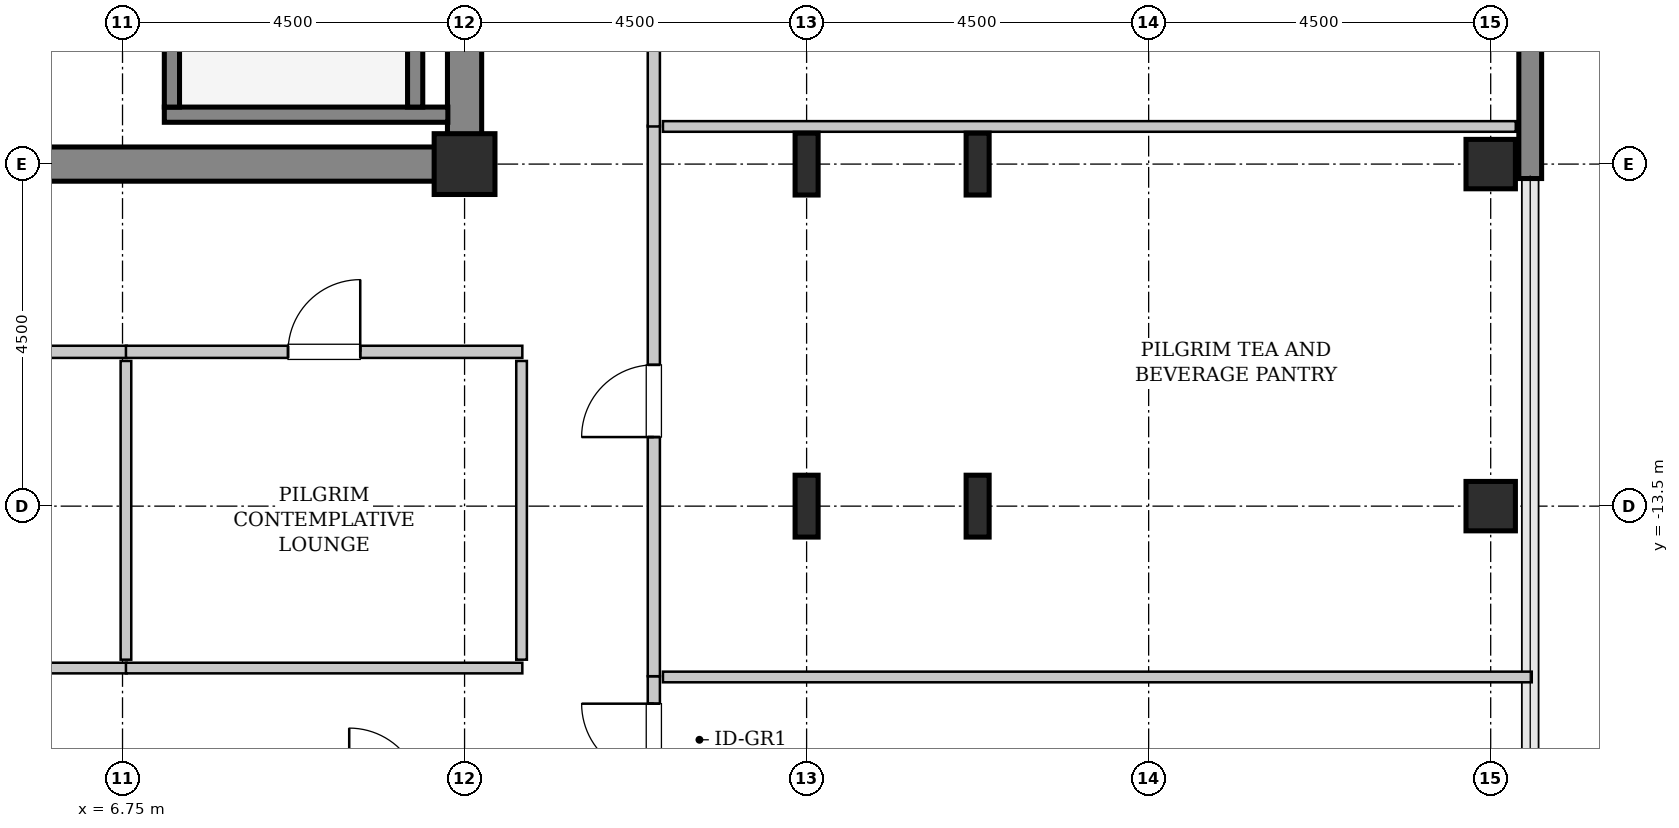
"""IFC4 building model, lengths in metres.
Left out: names, types, materials, properties, quantities, classifications, styles, units other than length and angle.
Written with IfcOpenShell. Run it as: python <this file> out.ifc"""

import sys

from ifc_helpers import new_model, si_unit, direction, frame, frame_2d, origin, origin_2d, place, context, subcontext, project, spatial, rectangle, hollow_rectangle, i_section, extrude, source, transform, mapped, element, fill, save


model = new_model("IFC4")
c1 = context("Model", 3, precision=1e-05, world=origin(), true_north=direction((0.0, 1.0)))
c2 = subcontext(c1, "Body", "Model", "MODEL_VIEW")
j1 = project(units=[si_unit("LENGTHUNIT", "METRE"), si_unit("PLANEANGLEUNIT", "RADIAN")], contexts=[c1])
p1 = place(None, origin())
s1 = spatial("IfcSite", under=j1, at=p1, CompositionType="ELEMENT")
p2 = place(p1, origin())
s2 = spatial("IfcBuilding", under=s1, at=p2, CompositionType="ELEMENT")
p3 = place(p2, frame((0.0, 0.0, 252.2)))
s3 = spatial("IfcBuildingStorey", under=s2, at=p3, CompositionType="ELEMENT", Elevation=252.2)
m1 = source(origin(), c2, "Body", "SweptSolid", [
    extrude(rectangle(XDim=9.925, YDim=0.45, at=frame_2d((4.962, 0.0))), origin(), (0.0, 0.0, 1.0), 3.8),
])
p4 = place(p3, frame((1.55, -9.0, 0.0), z_axis=(0.0, 0.0, 1.0), x_axis=(1.0, 0.0, 0.0)))
e1 = element("IfcWall", 1, at=p4, inside=s3, PredefinedType="SHEAR", context=c2, shape_type="MappedRepresentation", body=[
    mapped(m1, transform((0.0, 0.0, 0.0), x_axis=(1.0, 0.0, 0.0), y_axis=(0.0, 1.0, 0.0), z_axis=(0.0, 0.0, 1.0), scale=1.0)),
])
m2 = source(origin(), c2, "Body", "SweptSolid", [
    extrude(rectangle(XDim=7.425, YDim=0.45, at=frame_2d((3.712, 0.0))), origin(), (0.0, 0.0, 1.0), 3.8),
])
p5 = place(p3, frame((11.25, -8.775, 0.0), z_axis=(0.0, 0.0, 1.0), x_axis=(0.0, 1.0, 0.0)))
e2 = element("IfcWall", 2, at=p5, inside=s3, PredefinedType="SHEAR", context=c2, shape_type="MappedRepresentation", body=[
    mapped(m2, transform((0.0, 0.0, 0.0), x_axis=(1.0, 0.0, 0.0), y_axis=(0.0, 1.0, 0.0), z_axis=(0.0, 0.0, 1.0), scale=1.0)),
])
m3 = source(origin(), c2, "Body", "SweptSolid", [
    extrude(hollow_rectangle(XDim=0.8, YDim=0.8, WallThickness=0.04, InnerFilletRadius=0.04, OuterFilletRadius=0.08, at=origin_2d()), origin(), (0.0, 0.0, 1.0), 3.8),
])
p6 = place(p3, frame((11.25, -9.0, 0.0), z_axis=(0.0, 0.0, 1.0), x_axis=(1.0, 0.0, 0.0)))
e3 = element("IfcColumn", 3, at=p6, inside=s3, PredefinedType="COLUMN", context=c2, shape_type="MappedRepresentation", body=[
    mapped(m3, transform((0.0, 0.0, 0.0), x_axis=(1.0, 0.0, 0.0), y_axis=(0.0, 1.0, 0.0), z_axis=(0.0, 0.0, 1.0), scale=1.0)),
])
m4 = source(origin(), c2, "Body", "SweptSolid", [
    extrude(i_section(OverallWidth=0.303, OverallDepth=0.814, WebThickness=0.021, FlangeThickness=0.04, FilletRadius=0.03, at=origin_2d()), origin(), (0.0, 0.0, 1.0), 3.8),
])
for number, where, z_axis, x_axis in (
    (4, (15.75, -13.5, 0.0), (0.0, 0.0, 1.0), (1.0, 0.0, 0.0)),
    (5, (15.75, -9.0, 0.0), (0.0, 0.0, 1.0), (1.0, 0.0, 0.0)),
    (6, (18.0, -13.5, 0.0), (0.0, 0.0, 1.0), (1.0, 0.0, 0.0)),
    (7, (18.0, -9.0, 0.0), (0.0, 0.0, 1.0), (1.0, 0.0, 0.0)),
):
    element("IfcColumn", number, at=place(p3, frame(where, z_axis=z_axis, x_axis=x_axis)), inside=s3, PredefinedType="COLUMN", context=c2, shape_type="MappedRepresentation", body=[
        mapped(m4, transform((0.0, 0.0, 0.0), x_axis=(1.0, 0.0, 0.0), y_axis=(0.0, 1.0, 0.0), z_axis=(0.0, 0.0, 1.0), scale=1.0)),
    ])
m5 = source(origin(), c2, "Body", "SweptSolid", [
    extrude(hollow_rectangle(XDim=0.65, YDim=0.65, WallThickness=0.032, InnerFilletRadius=0.032, OuterFilletRadius=0.064, at=origin_2d()), origin(), (0.0, 0.0, 1.0), 3.8),
])
for number, where, z_axis, x_axis in (
    (8, (24.75, -13.5, 0.0), (0.0, 0.0, 1.0), (1.0, 0.0, 0.0)),
    (9, (24.75, -9.0, 0.0), (0.0, 0.0, 1.0), (1.0, 0.0, 0.0)),
):
    element("IfcColumn", number, at=place(p3, frame(where, z_axis=z_axis, x_axis=x_axis)), inside=s3, PredefinedType="COLUMN", context=c2, shape_type="MappedRepresentation", body=[
        mapped(m5, transform((0.0, 0.0, 0.0), x_axis=(1.0, 0.0, 0.0), y_axis=(0.0, 1.0, 0.0), z_axis=(0.0, 0.0, 1.0), scale=1.0)),
    ])
m6 = source(origin(), c2, "Body", "SweptSolid", [
    extrude(rectangle(XDim=4.88, YDim=0.3, at=frame_2d((2.44, 0.0))), origin(), (0.0, 0.0, 1.0), 3.55),
])
p7 = place(p3, frame((25.27, -9.19, 0.0), z_axis=(0.0, 0.0, 1.0), x_axis=(0.0, 1.0, 0.0)))
e10 = element("IfcWall", 10, at=p7, inside=s3, PredefinedType="SHEAR", context=c2, shape_type="MappedRepresentation", body=[
    mapped(m6, transform((0.0, 0.0, 0.0), x_axis=(1.0, 0.0, 0.0), y_axis=(0.0, 1.0, 0.0), z_axis=(0.0, 0.0, 1.0), scale=1.0)),
])
m7 = source(origin(), c2, "Body", "SweptSolid", [
    extrude(rectangle(XDim=3.73, YDim=0.2, at=frame_2d((1.865, 0.0))), origin(), (0.0, 0.0, 1.0), 3.8),
])
p8 = place(p3, frame((7.3, -8.35, 0.0), z_axis=(0.0, 0.0, 1.0), x_axis=(1.0, 0.0, 0.0)))
e11 = element("IfcWall", 11, at=p8, inside=s3, PredefinedType="SOLIDWALL", context=c2, shape_type="MappedRepresentation", body=[
    mapped(m7, transform((0.0, 0.0, 0.0), x_axis=(1.0, 0.0, 0.0), y_axis=(0.0, 1.0, 0.0), z_axis=(0.0, 0.0, 1.0), scale=1.0)),
])
m8 = source(origin(), c2, "Body", "SweptSolid", [
    extrude(rectangle(XDim=7.1, YDim=0.2, at=frame_2d((3.55, 0.0))), origin(), (0.0, 0.0, 1.0), 3.8),
])
p9 = place(p3, frame((7.4, -1.15, 0.0), z_axis=(0.0, 0.0, 1.0), x_axis=(0.0, -1.0, 0.0)))
e12 = element("IfcWall", 12, at=p9, inside=s3, PredefinedType="SOLIDWALL", context=c2, shape_type="MappedRepresentation", body=[
    mapped(m8, transform((0.0, 0.0, 0.0), x_axis=(1.0, 0.0, 0.0), y_axis=(0.0, 1.0, 0.0), z_axis=(0.0, 0.0, 1.0), scale=1.0)),
])
p10 = place(p9, frame((0.18, 0.0, 0.0)))
e13 = element("IfcOpeningElement", 13, at=p10, cuts=e12, PredefinedType="OPENING", context=c2, shape_type="SweptSolid", body=[
    extrude(rectangle(XDim=1.1, YDim=2.15, at=frame_2d((0.55, 1.075))), frame((0.0, 0.11, 0.0), z_axis=(0.0, -1.0, 0.0), x_axis=(1.0, 0.0, 0.0)), (0.0, 0.0, 1.0), 0.22),
])
p11 = place(p3, frame((10.6, -1.15, 0.0), z_axis=(0.0, 0.0, 1.0), x_axis=(0.0, -1.0, 0.0)))
e14 = element("IfcWall", 14, at=p11, inside=s3, PredefinedType="SOLIDWALL", context=c2, shape_type="MappedRepresentation", body=[
    mapped(m8, transform((0.0, 0.0, 0.0), x_axis=(1.0, 0.0, 0.0), y_axis=(0.0, 1.0, 0.0), z_axis=(0.0, 0.0, 1.0), scale=1.0)),
])
m9 = source(origin(), c2, "Body", "SweptSolid", [
    extrude(rectangle(XDim=7.302, YDim=0.16, at=frame_2d((3.651, 0.0))), origin(), (0.0, 0.0, 1.0), 3.535),
])
p12 = place(p3, frame((13.74, -23.04, 0.0), z_axis=(0.0, 0.0, 1.0), x_axis=(0.0, 1.0, 0.0)))
e15 = element("IfcWall", 15, at=p12, inside=s3, PredefinedType="PARTITIONING", context=c2, shape_type="MappedRepresentation", body=[
    mapped(m9, transform((0.0, 0.0, 0.0), x_axis=(1.0, 0.0, 0.0), y_axis=(0.0, 1.0, 0.0), z_axis=(0.0, 0.0, 1.0), scale=1.0)),
])
p13 = place(p12, frame((5.991, 0.0, 0.0)))
e16 = element("IfcOpeningElement", 16, at=p13, cuts=e15, PredefinedType="OPENING", context=c2, shape_type="SweptSolid", body=[
    extrude(rectangle(XDim=0.95, YDim=2.1, at=frame_2d((0.475, 1.05))), frame((0.0, 0.09, 0.0), z_axis=(0.0, -1.0, 0.0), x_axis=(1.0, 0.0, 0.0)), (0.0, 0.0, 1.0), 0.18),
])
m10 = source(origin(), c2, "Body", "SweptSolid", [
    extrude(rectangle(XDim=11.43, YDim=0.14, at=frame_2d((5.715, 0.0))), origin(), (0.0, 0.0, 1.0), 3.535),
])
p14 = place(p3, frame((13.86, -15.748, 0.0), z_axis=(0.0, 0.0, 1.0), x_axis=(1.0, 0.0, 0.0)))
e17 = element("IfcWall", 17, at=p14, inside=s3, PredefinedType="PARTITIONING", context=c2, shape_type="MappedRepresentation", body=[
    mapped(m10, transform((0.0, 0.0, 0.0), x_axis=(1.0, 0.0, 0.0), y_axis=(0.0, 1.0, 0.0), z_axis=(0.0, 0.0, 1.0), scale=1.0)),
])
m11 = source(origin(), c2, "Body", "SweptSolid", [
    extrude(rectangle(XDim=7.242, YDim=0.16, at=frame_2d((3.621, 0.0))), origin(), (0.0, 0.0, 1.0), 3.535),
])
p15 = place(p3, frame((13.74, -15.738, 0.0), z_axis=(0.0, 0.0, 1.0), x_axis=(0.0, 1.0, 0.0)))
e18 = element("IfcWall", 18, at=p15, inside=s3, PredefinedType="PARTITIONING", context=c2, shape_type="MappedRepresentation", body=[
    mapped(m11, transform((0.0, 0.0, 0.0), x_axis=(1.0, 0.0, 0.0), y_axis=(0.0, 1.0, 0.0), z_axis=(0.0, 0.0, 1.0), scale=1.0)),
])
p16 = place(p15, frame((3.146, 0.0, 0.0)))
e19 = element("IfcOpeningElement", 19, at=p16, cuts=e18, PredefinedType="OPENING", context=c2, shape_type="SweptSolid", body=[
    extrude(rectangle(XDim=0.95, YDim=2.1, at=frame_2d((0.475, 1.05))), frame((0.0, 0.09, 0.0), z_axis=(0.0, -1.0, 0.0), x_axis=(1.0, 0.0, 0.0)), (0.0, 0.0, 1.0), 0.18),
])
m12 = source(origin(), c2, "Body", "SweptSolid", [
    extrude(rectangle(XDim=11.22, YDim=0.14, at=frame_2d((5.61, 0.0))), origin(), (0.0, 0.0, 1.0), 2.925),
])
p17 = place(p3, frame((13.86, -8.505, 0.0), z_axis=(0.0, 0.0, 1.0), x_axis=(1.0, 0.0, 0.0)))
e20 = element("IfcWall", 20, at=p17, inside=s3, PredefinedType="PARTITIONING", context=c2, shape_type="MappedRepresentation", body=[
    mapped(m12, transform((0.0, 0.0, 0.0), x_axis=(1.0, 0.0, 0.0), y_axis=(0.0, 1.0, 0.0), z_axis=(0.0, 0.0, 1.0), scale=1.0)),
])
m13 = source(origin(), c2, "Body", "SweptSolid", [
    extrude(rectangle(XDim=3.31, YDim=0.16, at=frame_2d((1.655, 0.0))), origin(), (0.0, 0.0, 1.0), 3.535),
])
p18 = place(p3, frame((13.74, -8.505, 0.0), z_axis=(0.0, 0.0, 1.0), x_axis=(0.0, 1.0, 0.0)))
e21 = element("IfcWall", 21, at=p18, inside=s3, PredefinedType="PARTITIONING", context=c2, shape_type="MappedRepresentation", body=[
    mapped(m13, transform((0.0, 0.0, 0.0), x_axis=(1.0, 0.0, 0.0), y_axis=(0.0, 1.0, 0.0), z_axis=(0.0, 0.0, 1.0), scale=1.0)),
])
p19 = place(p18, frame((1.18, 0.0, 0.0)))
e22 = element("IfcOpeningElement", 22, at=p19, cuts=e21, PredefinedType="OPENING", context=c2, shape_type="SweptSolid", body=[
    extrude(rectangle(XDim=0.95, YDim=2.1, at=frame_2d((0.475, 1.05))), frame((0.0, 0.09, 0.0), z_axis=(0.0, -1.0, 0.0), x_axis=(1.0, 0.0, 0.0)), (0.0, 0.0, 1.0), 0.18),
])
m14 = source(origin(), c2, "Body", "SweptSolid", [
    extrude(rectangle(XDim=16.7, YDim=0.16, at=frame_2d((8.35, 0.0))), origin(), (0.0, 0.0, 1.0), 3.535),
])
p20 = place(p3, frame((-9.895, -11.47, 0.0), z_axis=(0.0, 0.0, 1.0), x_axis=(1.0, 0.0, 0.0)))
e23 = element("IfcWall", 23, at=p20, inside=s3, PredefinedType="PARTITIONING", context=c2, shape_type="MappedRepresentation", body=[
    mapped(m14, transform((0.0, 0.0, 0.0), x_axis=(1.0, 0.0, 0.0), y_axis=(0.0, 1.0, 0.0), z_axis=(0.0, 0.0, 1.0), scale=1.0)),
])
p21 = place(p20, frame((7.875, 0.0, 0.0)))
e24 = element("IfcOpeningElement", 24, at=p21, cuts=e23, PredefinedType="OPENING", context=c2, shape_type="SweptSolid", body=[
    extrude(rectangle(XDim=0.95, YDim=2.1, at=frame_2d((0.475, 1.05))), frame((0.0, 0.09, 0.0), z_axis=(0.0, -1.0, 0.0), x_axis=(1.0, 0.0, 0.0)), (0.0, 0.0, 1.0), 0.18),
])
m15 = source(origin(), c2, "Body", "SweptSolid", [
    extrude(rectangle(XDim=16.7, YDim=0.14, at=frame_2d((8.35, 0.0))), origin(), (0.0, 0.0, 1.0), 3.535),
])
p22 = place(p3, frame((-9.895, -15.63, 0.0), z_axis=(0.0, 0.0, 1.0), x_axis=(1.0, 0.0, 0.0)))
e25 = element("IfcWall", 25, at=p22, inside=s3, PredefinedType="PARTITIONING", context=c2, shape_type="MappedRepresentation", body=[
    mapped(m15, transform((0.0, 0.0, 0.0), x_axis=(1.0, 0.0, 0.0), y_axis=(0.0, 1.0, 0.0), z_axis=(0.0, 0.0, 1.0), scale=1.0)),
])
m16 = source(origin(), c2, "Body", "SweptSolid", [
    extrude(rectangle(XDim=3.93, YDim=0.14, at=frame_2d((1.965, 0.0))), origin(), (0.0, 0.0, 1.0), 3.535),
])
p23 = place(p3, frame((6.795, -15.52, 0.0), z_axis=(0.0, 0.0, 1.0), x_axis=(0.0, 1.0, 0.0)))
e26 = element("IfcWall", 26, at=p23, inside=s3, PredefinedType="PARTITIONING", context=c2, shape_type="MappedRepresentation", body=[
    mapped(m16, transform((0.0, 0.0, 0.0), x_axis=(1.0, 0.0, 0.0), y_axis=(0.0, 1.0, 0.0), z_axis=(0.0, 0.0, 1.0), scale=1.0)),
])
m17 = source(origin(), c2, "Body", "SweptSolid", [
    extrude(rectangle(XDim=5.215, YDim=0.16, at=frame_2d((2.607, 0.0))), origin(), (0.0, 0.0, 1.0), 3.535),
])
p24 = place(p3, frame((6.795, -11.47, 0.0), z_axis=(0.0, 0.0, 1.0), x_axis=(1.0, 0.0, 0.0)))
e27 = element("IfcWall", 27, at=p24, inside=s3, PredefinedType="PARTITIONING", context=c2, shape_type="MappedRepresentation", body=[
    mapped(m17, transform((0.0, 0.0, 0.0), x_axis=(1.0, 0.0, 0.0), y_axis=(0.0, 1.0, 0.0), z_axis=(0.0, 0.0, 1.0), scale=1.0)),
])
p25 = place(p24, frame((2.133, 0.0, 0.0)))
e28 = element("IfcOpeningElement", 28, at=p25, cuts=e27, PredefinedType="OPENING", context=c2, shape_type="SweptSolid", body=[
    extrude(rectangle(XDim=0.95, YDim=2.1, at=frame_2d((0.475, 1.05))), frame((0.0, 0.09, 0.0), z_axis=(0.0, -1.0, 0.0), x_axis=(1.0, 0.0, 0.0)), (0.0, 0.0, 1.0), 0.18),
])
m18 = source(origin(), c2, "Body", "SweptSolid", [
    extrude(rectangle(XDim=5.215, YDim=0.14, at=frame_2d((2.607, 0.0))), origin(), (0.0, 0.0, 1.0), 3.535),
])
p26 = place(p3, frame((6.795, -15.63, 0.0), z_axis=(0.0, 0.0, 1.0), x_axis=(1.0, 0.0, 0.0)))
e29 = element("IfcWall", 29, at=p26, inside=s3, PredefinedType="PARTITIONING", context=c2, shape_type="MappedRepresentation", body=[
    mapped(m18, transform((0.0, 0.0, 0.0), x_axis=(1.0, 0.0, 0.0), y_axis=(0.0, 1.0, 0.0), z_axis=(0.0, 0.0, 1.0), scale=1.0)),
])
p27 = place(p3, frame((12.0, -15.52, 0.0), z_axis=(0.0, 0.0, 1.0), x_axis=(0.0, 1.0, 0.0)))
e30 = element("IfcWall", 30, at=p27, inside=s3, PredefinedType="PARTITIONING", context=c2, shape_type="MappedRepresentation", body=[
    mapped(m16, transform((0.0, 0.0, 0.0), x_axis=(1.0, 0.0, 0.0), y_axis=(0.0, 1.0, 0.0), z_axis=(0.0, 0.0, 1.0), scale=1.0)),
])
m19 = source(origin(), c2, "Body", "SweptSolid", [
    extrude(rectangle(XDim=0.95, YDim=2.1, at=frame_2d((0.475, 1.05))), frame((0.0, 0.025, 0.0), z_axis=(0.0, -1.0, 0.0), x_axis=(1.0, 0.0, 0.0)), (0.0, 0.0, 1.0), 0.05),
])
p28 = place(p13, origin())
e31 = element("IfcDoor", 31, at=p28, inside=s3, OperationType="SINGLE_SWING_RIGHT", PredefinedType="DOOR", context=c2, shape_type="MappedRepresentation", body=[
    mapped(m19, transform((0.0, 0.0, 0.0), x_axis=(1.0, 0.0, 0.0), y_axis=(0.0, 1.0, 0.0), z_axis=(0.0, 0.0, 1.0), scale=1.0)),
])
fill(e16, e31)
p29 = place(p16, origin())
e32 = element("IfcDoor", 32, at=p29, inside=s3, OperationType="SINGLE_SWING_LEFT", PredefinedType="DOOR", context=c2, shape_type="MappedRepresentation", body=[
    mapped(m19, transform((0.0, 0.0, 0.0), x_axis=(1.0, 0.0, 0.0), y_axis=(0.0, 1.0, 0.0), z_axis=(0.0, 0.0, 1.0), scale=1.0)),
])
fill(e19, e32)
p30 = place(p25, origin())
e33 = element("IfcDoor", 33, at=p30, inside=s3, OperationType="SINGLE_SWING_RIGHT", PredefinedType="DOOR", context=c2, shape_type="MappedRepresentation", body=[
    mapped(m19, transform((0.0, 0.0, 0.0), x_axis=(1.0, 0.0, 0.0), y_axis=(0.0, 1.0, 0.0), z_axis=(0.0, 0.0, 1.0), scale=1.0)),
])
fill(e28, e33)
save(model, sys.argv[1])
